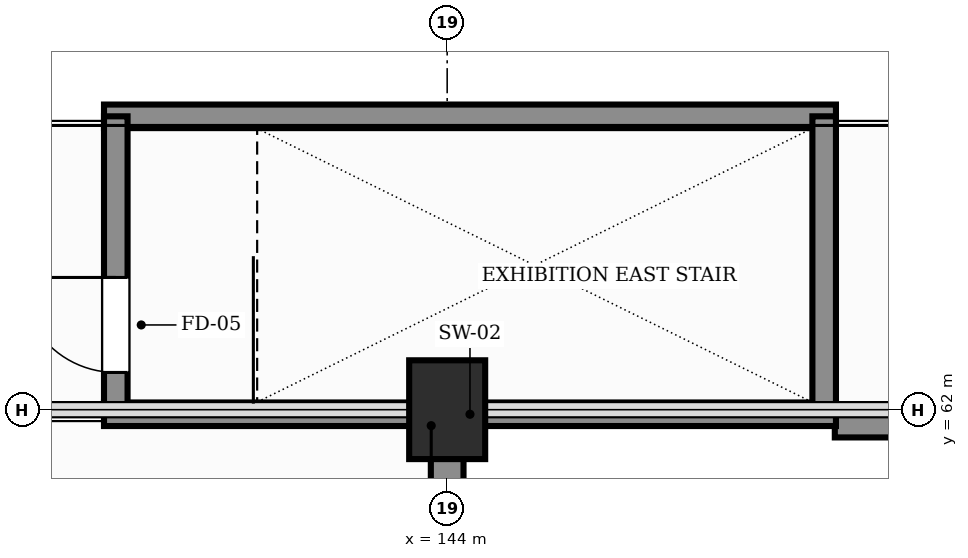
"""IFC4 building model, lengths in metres.
Left out: names, types, materials, properties, quantities, classifications, styles, units other than length and angle.
Written with IfcOpenShell. Run it as: python <this file> out.ifc"""

import sys

from ifc_helpers import new_model, si_unit, direction, frame, frame_2d, origin, origin_2d, place, context, subcontext, project, spatial, rectangle, extrude, element, fill, save


model = new_model("IFC4")
c1 = context("Model", 3, precision=1e-05, world=origin(), true_north=direction((0.0, 1.0)))
c2 = subcontext(c1, "Body", "Model", "MODEL_VIEW")
j1 = project(units=[si_unit("LENGTHUNIT", "METRE"), si_unit("PLANEANGLEUNIT", "RADIAN")], contexts=[c1])
p1 = place(None, origin())
s1 = spatial("IfcSite", under=j1, at=p1, CompositionType="ELEMENT")
p2 = place(p1, origin())
s2 = spatial("IfcBuilding", under=s1, at=p2, CompositionType="ELEMENT")
p3 = place(p2, frame((0.0, 0.0, 6.0)))
s3 = spatial("IfcBuildingStorey", under=s2, at=p3, CompositionType="ELEMENT", Elevation=6.0)
p4 = place(p3, frame((144.0, 62.0, 0.0), z_axis=(0.0, 0.0, 1.0), x_axis=(1.0, 0.0, 0.0)))
e1 = element("IfcColumn", 1, at=p4, inside=s3, PredefinedType="COLUMN", context=c2, shape_type="SweptSolid", body=[
    extrude(rectangle(XDim=1.0, YDim=1.3, at=origin_2d()), origin(), (0.0, 0.0, 1.0), 7.2),
])
p5 = place(p3, frame((149.1, 61.85, 0.0), z_axis=(0.0, 0.0, 1.0), x_axis=(1.0, 0.0, 0.0)))
e2 = element("IfcWall", 2, at=p5, inside=s3, PredefinedType="SOLIDWALL", context=c2, shape_type="SweptSolid", body=[
    extrude(rectangle(XDim=30.9, YDim=0.43, at=frame_2d((15.45, 0.0))), origin(), (0.0, 0.0, 1.0), 11.2),
])
p6 = place(p3, frame((144.0, 48.0, 0.0), z_axis=(0.0, 0.0, 1.0), x_axis=(0.0, 1.0, 0.0)))
e3 = element("IfcWall", 3, at=p6, inside=s3, PredefinedType="SOLIDWALL", context=c2, shape_type="SweptSolid", body=[
    extrude(rectangle(XDim=13.85, YDim=0.43, at=frame_2d((6.925, 0.0))), origin(), (0.0, 0.0, 1.0), 11.2),
])
for number, where, z_axis, x_axis in (
    (4, (139.485, 61.94, 0.0), (0.0, 0.0, 1.0), (1.0, 0.0, 0.0)),
    (5, (139.485, 65.86, 0.0), (0.0, 0.0, 1.0), (1.0, 0.0, 0.0)),
):
    element("IfcWall", number, at=place(p3, frame(where, z_axis=z_axis, x_axis=x_axis)), inside=s3, PredefinedType="SHEAR", context=c2, shape_type="SweptSolid", body=[
        extrude(rectangle(XDim=9.63, YDim=0.31, at=frame_2d((4.815, 0.0))), origin(), (0.0, 0.0, 1.0), 5.4),
    ])
p7 = place(p3, frame((139.64, 61.94, 0.0), z_axis=(0.0, 0.0, 1.0), x_axis=(0.0, 1.0, 0.0)))
e6 = element("IfcWall", 6, at=p7, inside=s3, PredefinedType="SHEAR", context=c2, shape_type="SweptSolid", body=[
    extrude(rectangle(XDim=3.92, YDim=0.31, at=frame_2d((1.96, 0.0))), origin(), (0.0, 0.0, 1.0), 5.4),
])
p8 = place(p7, frame((0.55, 0.0, 0.0)))
e7 = element("IfcOpeningElement", 7, at=p8, cuts=e6, PredefinedType="OPENING", context=c2, shape_type="SweptSolid", body=[
    extrude(rectangle(XDim=1.25, YDim=2.2, at=frame_2d((0.625, 1.1))), frame((0.0, 0.165, 0.0), z_axis=(0.0, -1.0, 0.0), x_axis=(1.0, 0.0, 0.0)), (0.0, 0.0, 1.0), 0.33),
])
p9 = place(p3, frame((148.96, 61.94, 0.0), z_axis=(0.0, 0.0, 1.0), x_axis=(0.0, 1.0, 0.0)))
e8 = element("IfcWall", 8, at=p9, inside=s3, PredefinedType="SHEAR", context=c2, shape_type="SweptSolid", body=[
    extrude(rectangle(XDim=3.92, YDim=0.31, at=frame_2d((1.96, 0.0))), origin(), (0.0, 0.0, 1.0), 5.4),
])
p10 = place(p8, origin())
e9 = element("IfcDoor", 9, at=p10, inside=s3, OperationType="SINGLE_SWING_RIGHT", PredefinedType="DOOR", context=c2, shape_type="SweptSolid", body=[
    extrude(rectangle(XDim=1.25, YDim=2.2, at=frame_2d((0.625, 1.1))), frame((0.0, 0.025, 0.0), z_axis=(0.0, -1.0, 0.0), x_axis=(1.0, 0.0, 0.0)), (0.0, 0.0, 1.0), 0.05),
])
fill(e7, e9)
save(model, sys.argv[1])
